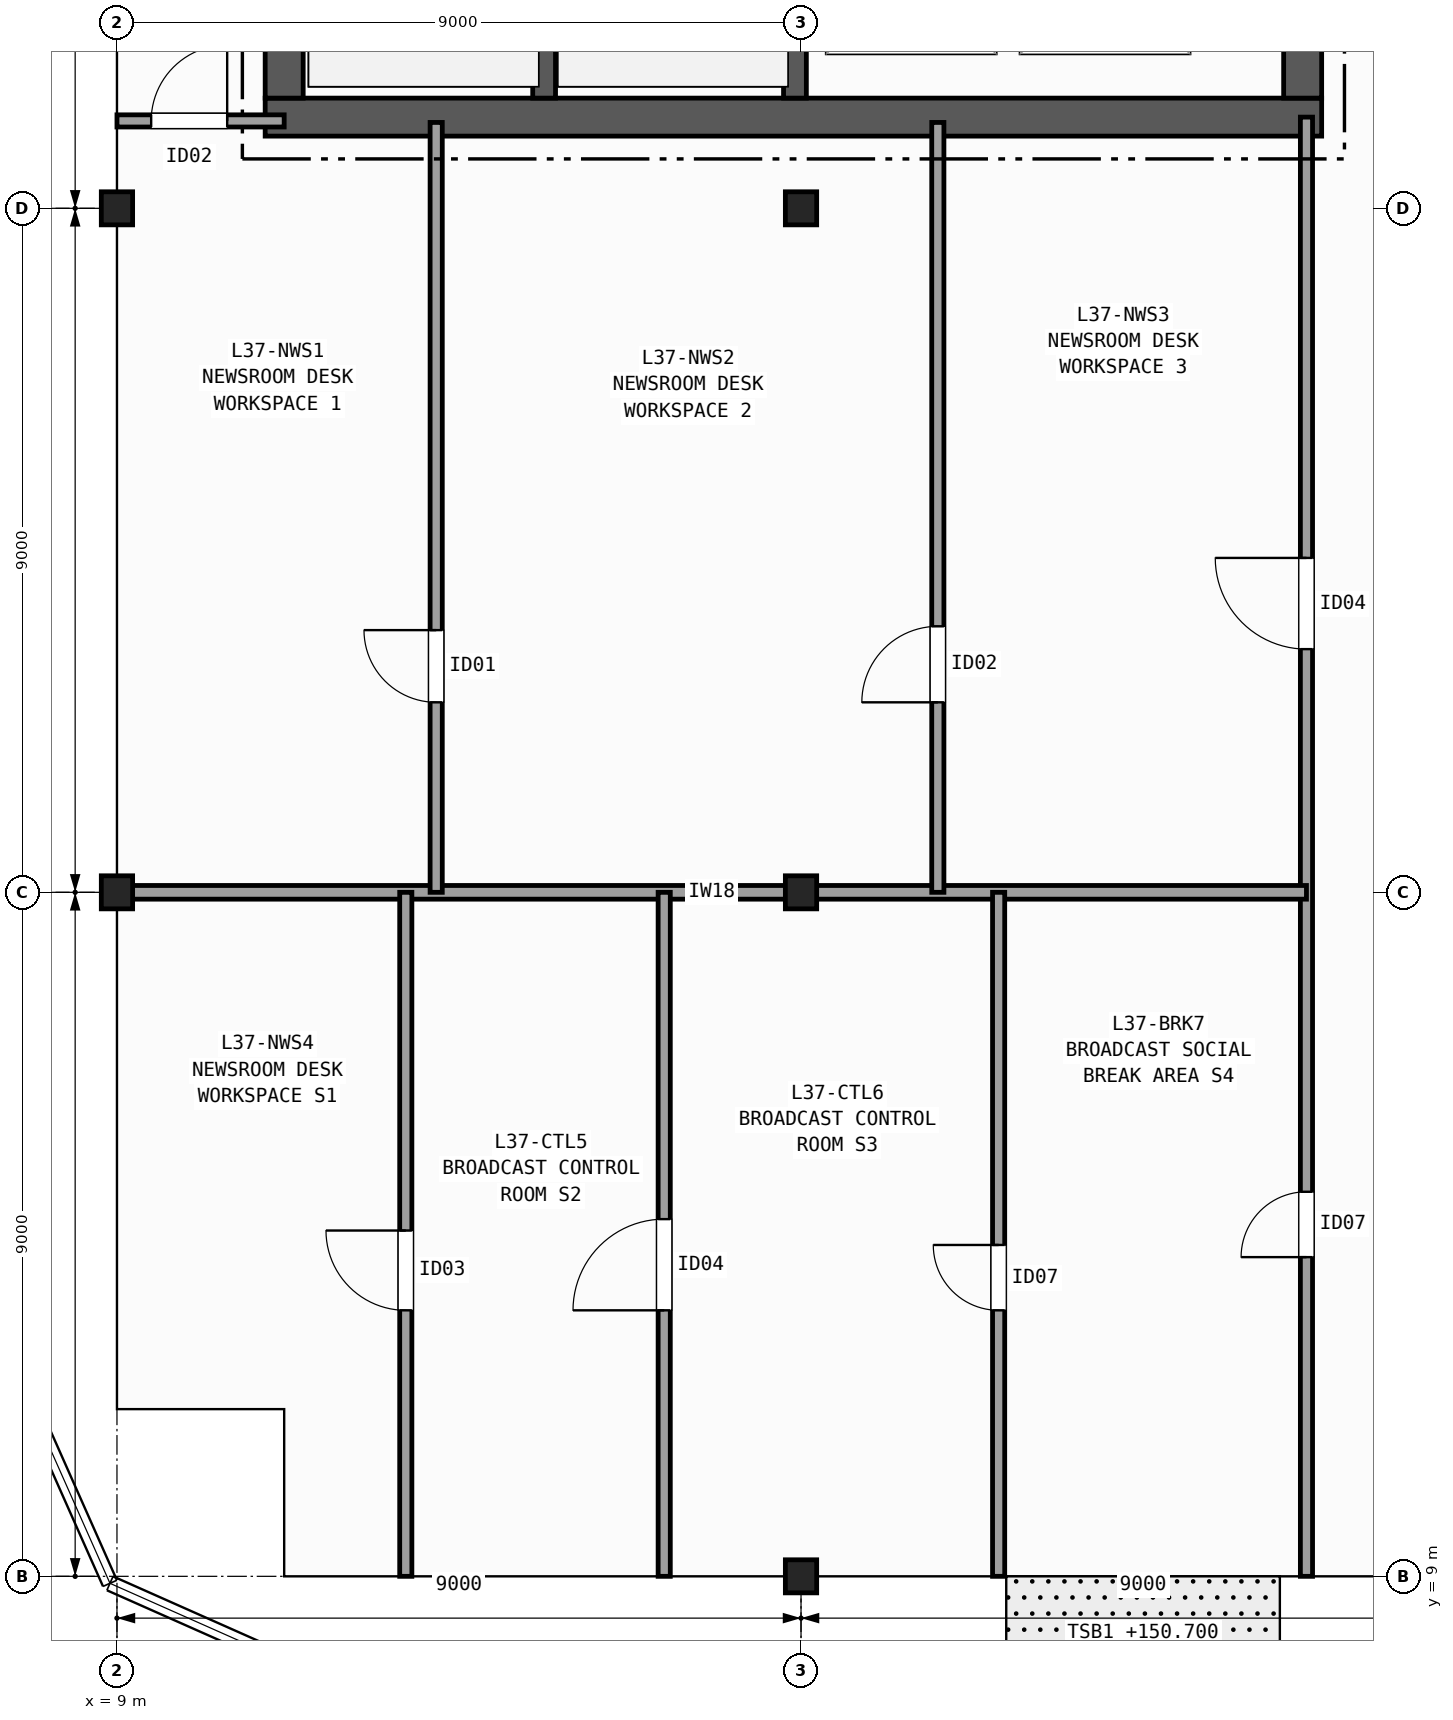
"""IFC4 building model, lengths in metres.
Left out: names, types, materials, properties, quantities, classifications, styles, units other than length and angle.
Written with IfcOpenShell. Run it as: python <this file> out.ifc"""

import sys

from ifc_helpers import new_model, si_unit, direction, frame, frame_2d, origin, origin_2d, place, context, subcontext, project, spatial, rectangle, i_section, extrude, element, fill, save


model = new_model("IFC4")
c1 = context("Model", 3, precision=1e-05, world=origin(), true_north=direction((0.0, 1.0)))
c2 = subcontext(c1, "Body", "Model", "MODEL_VIEW")
j1 = project(units=[si_unit("LENGTHUNIT", "METRE"), si_unit("PLANEANGLEUNIT", "RADIAN")], contexts=[c1])
p1 = place(None, origin())
s1 = spatial("IfcSite", under=j1, at=p1, CompositionType="ELEMENT")
p2 = place(p1, origin())
s2 = spatial("IfcBuilding", under=s1, at=p2, CompositionType="ELEMENT")
p3 = place(p2, frame((0.0, 0.0, 150.7)))
s3 = spatial("IfcBuildingStorey", under=s2, at=p3, CompositionType="ELEMENT", Elevation=150.7)
for number, where, z_axis, x_axis in (
    (1, (9.0, 18.0, 0.0), (0.0, 0.0, 1.0), (1.0, 0.0, 0.0)),
    (2, (9.0, 27.0, 0.0), (0.0, 0.0, 1.0), (1.0, 0.0, 0.0)),
    (3, (18.0, 9.0, 0.0), (0.0, 0.0, 1.0), (1.0, 0.0, 0.0)),
    (4, (18.0, 18.0, 0.0), (0.0, 0.0, 1.0), (1.0, 0.0, 0.0)),
    (5, (18.0, 27.0, 0.0), (0.0, 0.0, 1.0), (1.0, 0.0, 0.0)),
):
    element("IfcColumn", number, at=place(p3, frame(where, z_axis=z_axis, x_axis=x_axis)), inside=s3, PredefinedType="COLUMN", context=c2, shape_type="SweptSolid", body=[
        extrude(i_section(OverallWidth=0.412, OverallDepth=0.435, WebThickness=0.036, FlangeThickness=0.057, FilletRadius=0.015, at=origin_2d()), origin(), (0.0, 0.0, 1.0), 3.7),
    ])
p4 = place(p3, frame((10.95, 28.2, 0.0), z_axis=(0.0, 0.0, 1.0), x_axis=(1.0, 0.0, 0.0)))
e6 = element("IfcWall", 6, at=p4, inside=s3, PredefinedType="SHEAR", context=c2, shape_type="SweptSolid", body=[
    extrude(rectangle(XDim=13.9, YDim=0.5, at=frame_2d((6.95, 0.0))), origin(), (0.0, 0.0, 1.0), 3.42),
])
p5 = place(p3, frame((11.2, 42.15, 0.0), z_axis=(0.0, 0.0, 1.0), x_axis=(0.0, -1.0, 0.0)))
e7 = element("IfcWall", 7, at=p5, inside=s3, PredefinedType="SHEAR", context=c2, shape_type="SweptSolid", body=[
    extrude(rectangle(XDim=13.7, YDim=0.5, at=frame_2d((6.85, 0.0))), origin(), (0.0, 0.0, 1.0), 3.42),
])
p6 = place(p3, frame((24.6, 28.45, 0.0), z_axis=(0.0, 0.0, 1.0), x_axis=(0.0, 1.0, 0.0)))
e8 = element("IfcWall", 8, at=p6, inside=s3, PredefinedType="SHEAR", context=c2, shape_type="SweptSolid", body=[
    extrude(rectangle(XDim=13.7, YDim=0.5, at=frame_2d((6.85, 0.0))), origin(), (0.0, 0.0, 1.0), 3.42),
])
p7 = place(p6, frame((3.35, 0.0, 0.0)))
e9 = element("IfcOpeningElement", 9, at=p7, cuts=e8, PredefinedType="OPENING", context=c2, shape_type="SweptSolid", body=[
    extrude(rectangle(XDim=1.5, YDim=2.2, at=frame_2d((0.75, 1.1))), frame((0.0, 0.26, 0.0), z_axis=(0.0, -1.0, 0.0), x_axis=(1.0, 0.0, 0.0)), (0.0, 0.0, 1.0), 0.52),
])
p8 = place(p6, frame((9.95, 0.0, 0.0)))
e10 = element("IfcOpeningElement", 10, at=p8, cuts=e8, PredefinedType="OPENING", context=c2, shape_type="SweptSolid", body=[
    extrude(rectangle(XDim=0.9, YDim=2.1, at=frame_2d((0.45, 1.05))), frame((0.0, 0.26, 0.0), z_axis=(0.0, -1.0, 0.0), x_axis=(1.0, 0.0, 0.0)), (0.0, 0.0, 1.0), 0.52),
])
p9 = place(p3, frame((14.62, 28.45, 0.0), z_axis=(0.0, 0.0, 1.0), x_axis=(0.0, 1.0, 0.0)))
e11 = element("IfcWall", 11, at=p9, inside=s3, PredefinedType="SHEAR", context=c2, shape_type="SweptSolid", body=[
    extrude(rectangle(XDim=9.0, YDim=0.3, at=frame_2d((4.5, 0.0))), origin(), (0.0, 0.0, 1.0), 3.42),
])
p10 = place(p3, frame((17.92, 42.15, 0.0), z_axis=(0.0, 0.0, 1.0), x_axis=(0.0, -1.0, 0.0)))
e12 = element("IfcWall", 12, at=p10, inside=s3, PredefinedType="SHEAR", context=c2, shape_type="SweptSolid", body=[
    extrude(rectangle(XDim=13.7, YDim=0.3, at=frame_2d((6.85, 0.0))), origin(), (0.0, 0.0, 1.0), 3.42),
])
p11 = place(p10, frame((1.975, 0.0, 0.0)))
e13 = element("IfcOpeningElement", 13, at=p11, cuts=e12, PredefinedType="OPENING", context=c2, shape_type="SweptSolid", body=[
    extrude(rectangle(XDim=1.15, YDim=2.15, at=frame_2d((0.575, 1.075))), frame((0.0, 0.16, 0.0), z_axis=(0.0, -1.0, 0.0), x_axis=(1.0, 0.0, 0.0)), (0.0, 0.0, 1.0), 0.32),
])
p12 = place(p3, frame((9.0, 28.15, 0.0), z_axis=(0.0, 0.0, 1.0), x_axis=(1.0, 0.0, 0.0)))
e14 = element("IfcWall", 14, at=p12, inside=s3, PredefinedType="PARTITIONING", context=c2, shape_type="SweptSolid", body=[
    extrude(rectangle(XDim=2.2, YDim=0.16, at=frame_2d((1.1, 0.0))), origin(), (0.0, 0.0, 1.0), 2.634),
])
p13 = place(p12, frame((0.45, 0.0, 0.0)))
e15 = element("IfcOpeningElement", 15, at=p13, cuts=e14, PredefinedType="OPENING", context=c2, shape_type="SweptSolid", body=[
    extrude(rectangle(XDim=1.0, YDim=2.1, at=frame_2d((0.5, 1.05))), frame((0.0, 0.09, 0.0), z_axis=(0.0, -1.0, 0.0), x_axis=(1.0, 0.0, 0.0)), (0.0, 0.0, 1.0), 0.18),
])
p14 = place(p3, frame((24.65, 9.0, 0.0), z_axis=(0.0, 0.0, 1.0), x_axis=(0.0, 1.0, 0.0)))
e16 = element("IfcWall", 16, at=p14, inside=s3, PredefinedType="PARTITIONING", context=c2, shape_type="SweptSolid", body=[
    extrude(rectangle(XDim=19.2, YDim=0.16, at=frame_2d((9.6, 0.0))), origin(), (0.0, 0.0, 1.0), 2.634),
])
p15 = place(p14, frame((12.2, 0.0, 0.0)))
e17 = element("IfcOpeningElement", 17, at=p15, cuts=e16, PredefinedType="OPENING", context=c2, shape_type="SweptSolid", body=[
    extrude(rectangle(XDim=1.2, YDim=2.15, at=frame_2d((0.6, 1.075))), frame((0.0, 0.09, 0.0), z_axis=(0.0, -1.0, 0.0), x_axis=(1.0, 0.0, 0.0)), (0.0, 0.0, 1.0), 0.18),
])
p16 = place(p14, frame((4.2, 0.0, 0.0)))
e18 = element("IfcOpeningElement", 18, at=p16, cuts=e16, PredefinedType="OPENING", context=c2, shape_type="SweptSolid", body=[
    extrude(rectangle(XDim=0.86, YDim=2.05, at=frame_2d((0.43, 1.025))), frame((0.0, 0.09, 0.0), z_axis=(0.0, -1.0, 0.0), x_axis=(1.0, 0.0, 0.0)), (0.0, 0.0, 1.0), 0.18),
])
p17 = place(p3, frame((9.0, 18.0, 0.0), z_axis=(0.0, 0.0, 1.0), x_axis=(1.0, 0.0, 0.0)))
e19 = element("IfcWall", 19, at=p17, inside=s3, PredefinedType="PARTITIONING", context=c2, shape_type="SweptSolid", body=[
    extrude(rectangle(XDim=15.65, YDim=0.18, at=frame_2d((7.825, 0.0))), origin(), (0.0, 0.0, 1.0), 2.634),
])
p18 = place(p3, frame((13.2, 18.0, 0.0), z_axis=(0.0, 0.0, 1.0), x_axis=(0.0, 1.0, 0.0)))
e20 = element("IfcWall", 20, at=p18, inside=s3, PredefinedType="PARTITIONING", context=c2, shape_type="SweptSolid", body=[
    extrude(rectangle(XDim=10.13, YDim=0.16, at=frame_2d((5.065, 0.0))), origin(), (0.0, 0.0, 1.0), 2.789),
])
p19 = place(p18, frame((2.5, 0.0, 0.0)))
e21 = element("IfcOpeningElement", 21, at=p19, cuts=e20, PredefinedType="OPENING", context=c2, shape_type="SweptSolid", body=[
    extrude(rectangle(XDim=0.95, YDim=2.1, at=frame_2d((0.475, 1.05))), frame((0.0, 0.09, 0.0), z_axis=(0.0, -1.0, 0.0), x_axis=(1.0, 0.0, 0.0)), (0.0, 0.0, 1.0), 0.18),
])
p20 = place(p3, frame((19.8, 18.0, 0.0), z_axis=(0.0, 0.0, 1.0), x_axis=(0.0, 1.0, 0.0)))
e22 = element("IfcWall", 22, at=p20, inside=s3, PredefinedType="PARTITIONING", context=c2, shape_type="SweptSolid", body=[
    extrude(rectangle(XDim=10.13, YDim=0.16, at=frame_2d((5.065, 0.0))), origin(), (0.0, 0.0, 1.0), 2.789),
])
p21 = place(p20, frame((2.5, 0.0, 0.0)))
e23 = element("IfcOpeningElement", 23, at=p21, cuts=e22, PredefinedType="OPENING", context=c2, shape_type="SweptSolid", body=[
    extrude(rectangle(XDim=1.0, YDim=2.1, at=frame_2d((0.5, 1.05))), frame((0.0, 0.09, 0.0), z_axis=(0.0, -1.0, 0.0), x_axis=(1.0, 0.0, 0.0)), (0.0, 0.0, 1.0), 0.18),
])
p22 = place(p3, frame((12.8, 9.0, 0.0), z_axis=(0.0, 0.0, 1.0), x_axis=(0.0, 1.0, 0.0)))
e24 = element("IfcWall", 24, at=p22, inside=s3, PredefinedType="PARTITIONING", context=c2, shape_type="SweptSolid", body=[
    extrude(rectangle(XDim=9.0, YDim=0.16, at=frame_2d((4.5, 0.0))), origin(), (0.0, 0.0, 1.0), 2.789),
])
p23 = place(p22, frame((3.5, 0.0, 0.0)))
e25 = element("IfcOpeningElement", 25, at=p23, cuts=e24, PredefinedType="OPENING", context=c2, shape_type="SweptSolid", body=[
    extrude(rectangle(XDim=1.05, YDim=2.15, at=frame_2d((0.525, 1.075))), frame((0.0, 0.09, 0.0), z_axis=(0.0, -1.0, 0.0), x_axis=(1.0, 0.0, 0.0)), (0.0, 0.0, 1.0), 0.18),
])
p24 = place(p3, frame((16.2, 9.0, 0.0), z_axis=(0.0, 0.0, 1.0), x_axis=(0.0, 1.0, 0.0)))
e26 = element("IfcWall", 26, at=p24, inside=s3, PredefinedType="PARTITIONING", context=c2, shape_type="SweptSolid", body=[
    extrude(rectangle(XDim=9.0, YDim=0.16, at=frame_2d((4.5, 0.0))), origin(), (0.0, 0.0, 1.0), 2.789),
])
p25 = place(p24, frame((3.5, 0.0, 0.0)))
e27 = element("IfcOpeningElement", 27, at=p25, cuts=e26, PredefinedType="OPENING", context=c2, shape_type="SweptSolid", body=[
    extrude(rectangle(XDim=1.2, YDim=2.15, at=frame_2d((0.6, 1.075))), frame((0.0, 0.09, 0.0), z_axis=(0.0, -1.0, 0.0), x_axis=(1.0, 0.0, 0.0)), (0.0, 0.0, 1.0), 0.18),
])
p26 = place(p3, frame((20.6, 9.0, 0.0), z_axis=(0.0, 0.0, 1.0), x_axis=(0.0, 1.0, 0.0)))
e28 = element("IfcWall", 28, at=p26, inside=s3, PredefinedType="PARTITIONING", context=c2, shape_type="SweptSolid", body=[
    extrude(rectangle(XDim=9.0, YDim=0.16, at=frame_2d((4.5, 0.0))), origin(), (0.0, 0.0, 1.0), 2.634),
])
p27 = place(p26, frame((3.5, 0.0, 0.0)))
e29 = element("IfcOpeningElement", 29, at=p27, cuts=e28, PredefinedType="OPENING", context=c2, shape_type="SweptSolid", body=[
    extrude(rectangle(XDim=0.86, YDim=2.05, at=frame_2d((0.43, 1.025))), frame((0.0, 0.09, 0.0), z_axis=(0.0, -1.0, 0.0), x_axis=(1.0, 0.0, 0.0)), (0.0, 0.0, 1.0), 0.18),
])
p28 = place(p13, origin())
e30 = element("IfcDoor", 30, at=p28, inside=s3, OperationType="SINGLE_SWING_RIGHT", PredefinedType="DOOR", context=c2, shape_type="SweptSolid", body=[
    extrude(rectangle(XDim=1.0, YDim=2.1, at=frame_2d((0.5, 1.05))), frame((0.0, 0.025, 0.0), z_axis=(0.0, -1.0, 0.0), x_axis=(1.0, 0.0, 0.0)), (0.0, 0.0, 1.0), 0.05),
])
fill(e15, e30)
p29 = place(p15, origin())
e31 = element("IfcDoor", 31, at=p29, inside=s3, OperationType="SINGLE_SWING_RIGHT", PredefinedType="DOOR", context=c2, shape_type="SweptSolid", body=[
    extrude(rectangle(XDim=1.2, YDim=2.15, at=frame_2d((0.6, 1.075))), frame((0.0, 0.025, 0.0), z_axis=(0.0, -1.0, 0.0), x_axis=(1.0, 0.0, 0.0)), (0.0, 0.0, 1.0), 0.05),
])
fill(e17, e31)
p30 = place(p16, origin())
e32 = element("IfcDoor", 32, at=p30, inside=s3, OperationType="SINGLE_SWING_LEFT", PredefinedType="DOOR", context=c2, shape_type="SweptSolid", body=[
    extrude(rectangle(XDim=0.86, YDim=2.05, at=frame_2d((0.43, 1.025))), frame((0.0, 0.025, 0.0), z_axis=(0.0, -1.0, 0.0), x_axis=(1.0, 0.0, 0.0)), (0.0, 0.0, 1.0), 0.05),
])
fill(e18, e32)
p31 = place(p19, origin())
e33 = element("IfcDoor", 33, at=p31, inside=s3, OperationType="SINGLE_SWING_RIGHT", PredefinedType="DOOR", context=c2, shape_type="SweptSolid", body=[
    extrude(rectangle(XDim=0.95, YDim=2.1, at=frame_2d((0.475, 1.05))), frame((0.0, 0.025, 0.0), z_axis=(0.0, -1.0, 0.0), x_axis=(1.0, 0.0, 0.0)), (0.0, 0.0, 1.0), 0.05),
])
fill(e21, e33)
p32 = place(p21, origin())
e34 = element("IfcDoor", 34, at=p32, inside=s3, OperationType="SINGLE_SWING_LEFT", PredefinedType="DOOR", context=c2, shape_type="SweptSolid", body=[
    extrude(rectangle(XDim=1.0, YDim=2.1, at=frame_2d((0.5, 1.05))), frame((0.0, 0.025, 0.0), z_axis=(0.0, -1.0, 0.0), x_axis=(1.0, 0.0, 0.0)), (0.0, 0.0, 1.0), 0.05),
])
fill(e23, e34)
p33 = place(p23, origin())
e35 = element("IfcDoor", 35, at=p33, inside=s3, OperationType="SINGLE_SWING_RIGHT", PredefinedType="DOOR", context=c2, shape_type="SweptSolid", body=[
    extrude(rectangle(XDim=1.05, YDim=2.15, at=frame_2d((0.525, 1.075))), frame((0.0, 0.025, 0.0), z_axis=(0.0, -1.0, 0.0), x_axis=(1.0, 0.0, 0.0)), (0.0, 0.0, 1.0), 0.05),
])
fill(e25, e35)
p34 = place(p25, origin())
e36 = element("IfcDoor", 36, at=p34, inside=s3, OperationType="SINGLE_SWING_LEFT", PredefinedType="DOOR", context=c2, shape_type="SweptSolid", body=[
    extrude(rectangle(XDim=1.2, YDim=2.15, at=frame_2d((0.6, 1.075))), frame((0.0, 0.025, 0.0), z_axis=(0.0, -1.0, 0.0), x_axis=(1.0, 0.0, 0.0)), (0.0, 0.0, 1.0), 0.05),
])
fill(e27, e36)
p35 = place(p27, origin())
e37 = element("IfcDoor", 37, at=p35, inside=s3, OperationType="SINGLE_SWING_RIGHT", PredefinedType="DOOR", context=c2, shape_type="SweptSolid", body=[
    extrude(rectangle(XDim=0.86, YDim=2.05, at=frame_2d((0.43, 1.025))), frame((0.0, 0.025, 0.0), z_axis=(0.0, -1.0, 0.0), x_axis=(1.0, 0.0, 0.0)), (0.0, 0.0, 1.0), 0.05),
])
fill(e29, e37)
save(model, sys.argv[1])
